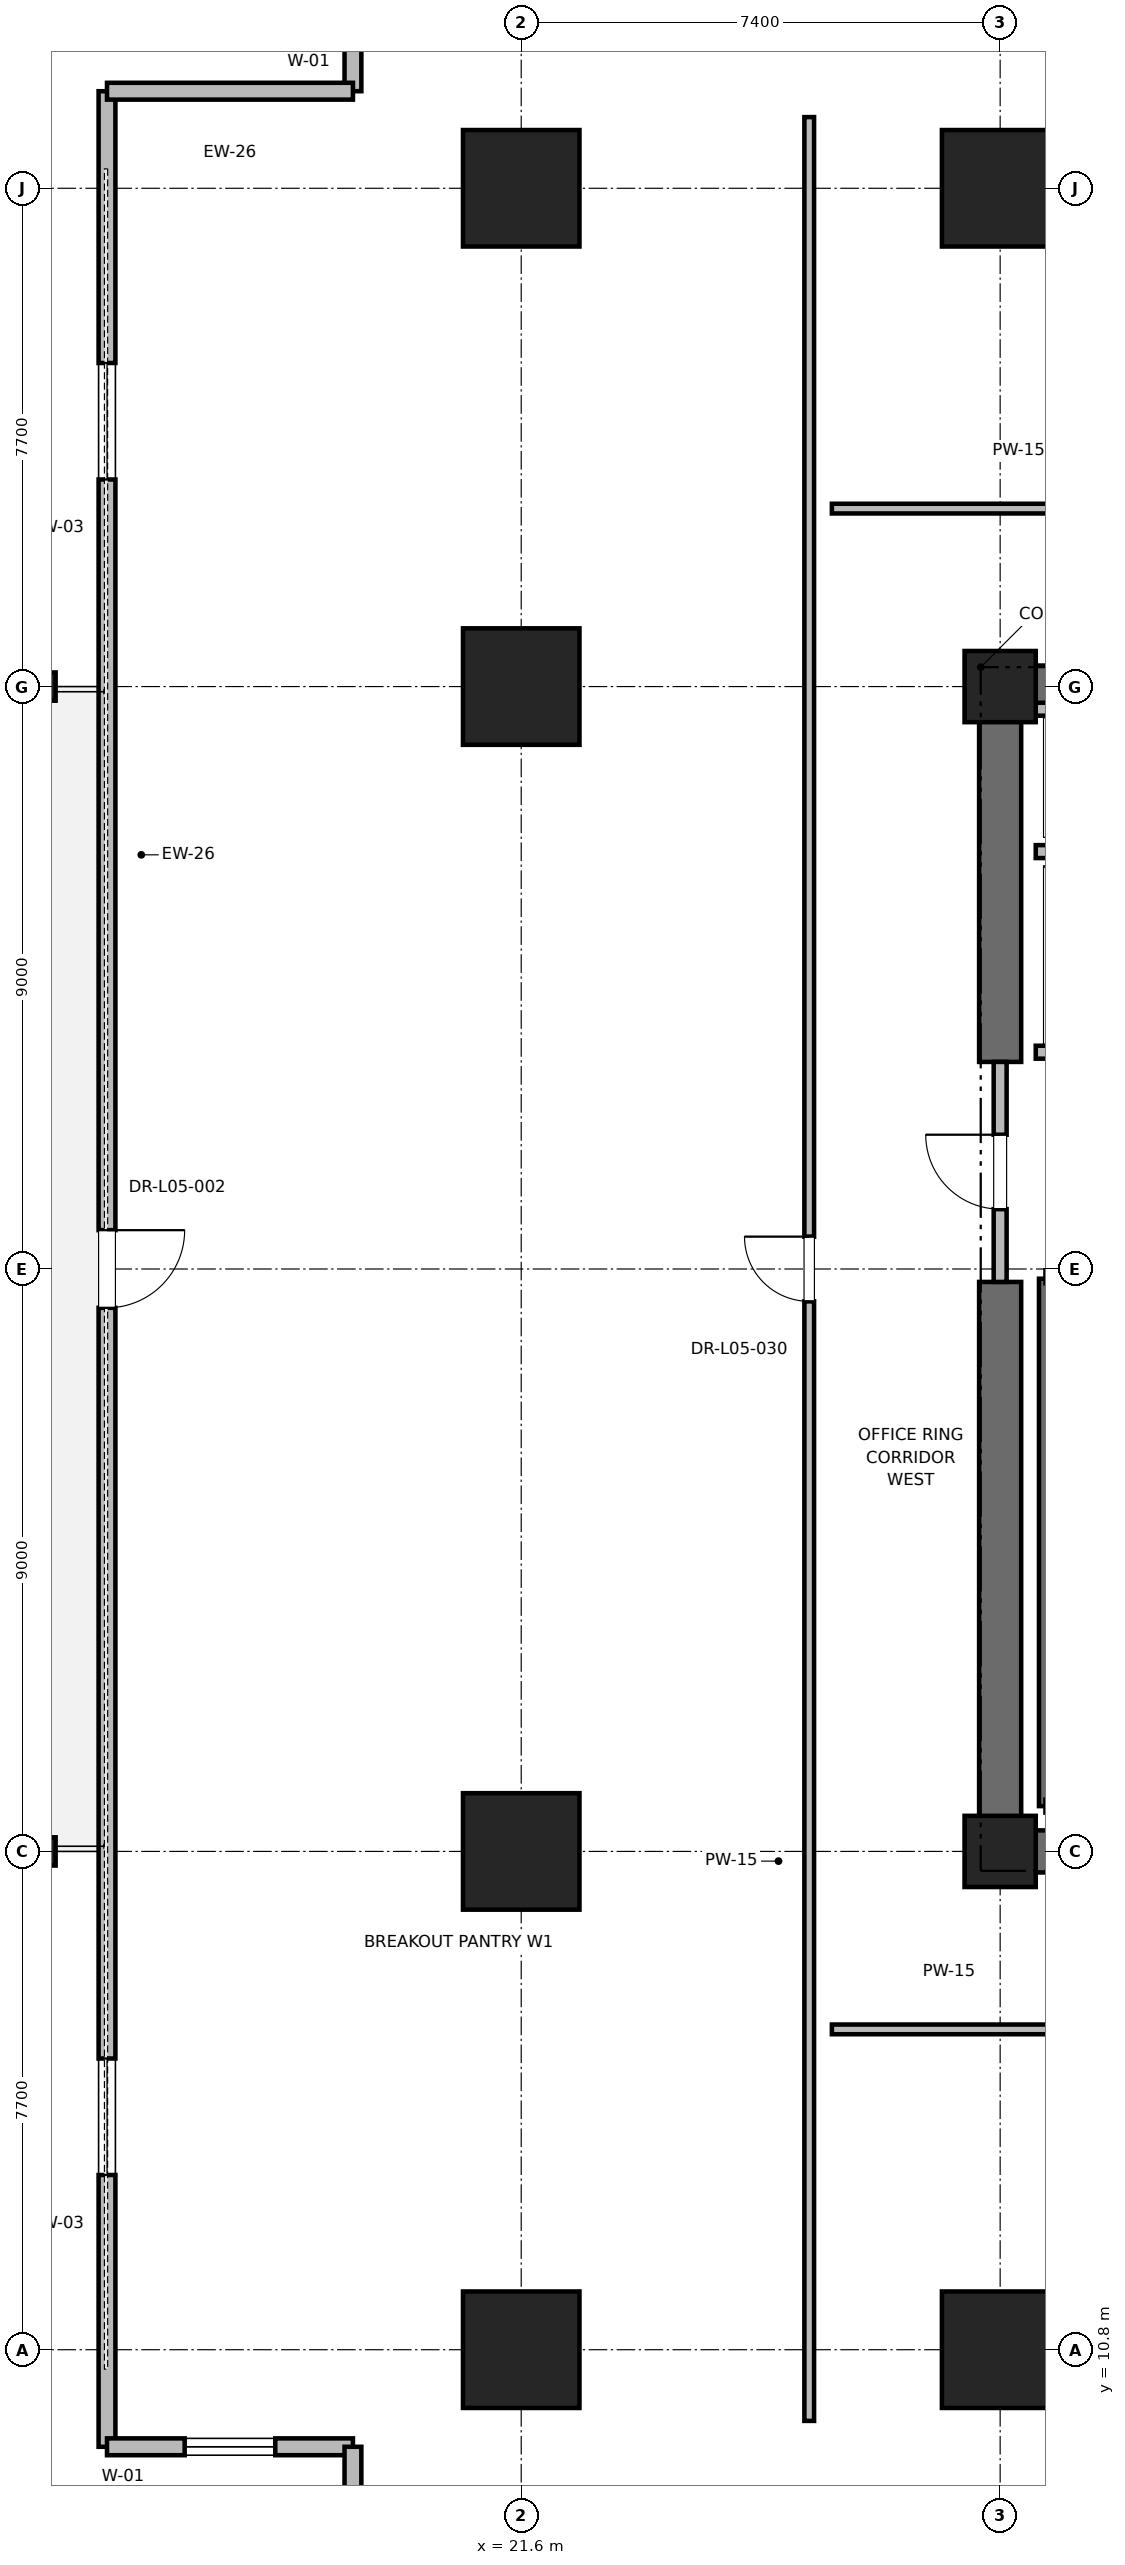
"""IFC4 building model, lengths in metres.
Left out: names, types, materials, properties, quantities, classifications, styles, units other than length and angle.
Written with IfcOpenShell. Run it as: python <this file> out.ifc"""

import sys

from ifc_helpers import new_model, si_unit, direction, frame, frame_2d, origin, origin_2d, place, context, subcontext, project, spatial, rectangle, i_section, extrude, element, fill, save


model = new_model("IFC4")
c1 = context("Model", 3, precision=1e-05, world=origin(), true_north=direction((0.0, 1.0)))
c2 = subcontext(c1, "Body", "Model", "MODEL_VIEW")
j1 = project(units=[si_unit("LENGTHUNIT", "METRE"), si_unit("PLANEANGLEUNIT", "RADIAN")], contexts=[c1])
p1 = place(None, origin())
s1 = spatial("IfcSite", under=j1, at=p1, CompositionType="ELEMENT")
p2 = place(p1, origin())
s2 = spatial("IfcBuilding", under=s1, at=p2, CompositionType="ELEMENT")
p3 = place(p2, frame((0.0, 0.0, 27.6)))
s3 = spatial("IfcBuildingStorey", under=s2, at=p3, CompositionType="ELEMENT", Elevation=27.6)
for number, where, z_axis, x_axis in (
    (1, (29.0, 10.8, 0.0), (0.0, 0.0, 1.0), (1.0, 0.0, 0.0)),
    (2, (29.0, 44.2, 0.0), (0.0, 0.0, 1.0), (1.0, 0.0, 0.0)),
    (3, (21.6, 18.5, 0.0), (0.0, 0.0, 1.0), (1.0, 0.0, 0.0)),
    (4, (21.6, 36.5, 0.0), (0.0, 0.0, 1.0), (1.0, 0.0, 0.0)),
    (5, (21.6, 10.8, 0.0), (0.0, 0.0, 1.0), (1.0, 0.0, 0.0)),
    (6, (21.6, 44.2, 0.0), (0.0, 0.0, 1.0), (1.0, 0.0, 0.0)),
):
    element("IfcColumn", number, at=place(p3, frame(where, z_axis=z_axis, x_axis=x_axis)), inside=s3, PredefinedType="COLUMN", context=c2, shape_type="SweptSolid", body=[
        extrude(rectangle(XDim=1.8, YDim=1.8, at=origin_2d()), origin(), (0.0, 0.0, 1.0), 4.0),
    ])
for number, where, z_axis, x_axis in (
    (7, (14.2, 18.5, 0.0), (0.0, 0.0, 1.0), (1.0, 0.0, 0.0)),
    (8, (14.2, 36.5, 0.0), (0.0, 0.0, 1.0), (1.0, 0.0, 0.0)),
):
    element("IfcColumn", number, at=place(p3, frame(where, z_axis=z_axis, x_axis=x_axis)), inside=s3, PredefinedType="COLUMN", context=c2, shape_type="SweptSolid", body=[
        extrude(i_section(OverallWidth=0.412, OverallDepth=0.437, WebThickness=0.036, FlangeThickness=0.058, FilletRadius=0.015, at=origin_2d()), origin(), (0.0, 0.0, 1.0), 4.0),
    ])
for number, where, z_axis, x_axis in (
    (9, (29.0, 18.5, 0.0), (0.0, 0.0, 1.0), (1.0, 0.0, 0.0)),
    (10, (29.0, 36.5, 0.0), (0.0, 0.0, 1.0), (1.0, 0.0, 0.0)),
):
    element("IfcColumn", number, at=place(p3, frame(where, z_axis=z_axis, x_axis=x_axis)), inside=s3, PredefinedType="PILASTER", context=c2, shape_type="SweptSolid", body=[
        extrude(rectangle(XDim=1.1, YDim=1.1, at=origin_2d()), origin(), (0.0, 0.0, 1.0), 4.0),
    ])
p4 = place(p3, frame((29.0, 18.5, 0.0), z_axis=(0.0, 0.0, 1.0), x_axis=(1.0, 0.0, 0.0)))
e11 = element("IfcWall", 11, at=p4, inside=s3, PredefinedType="SHEAR", context=c2, shape_type="SweptSolid", body=[
    extrude(rectangle(XDim=9.2, YDim=0.65, at=frame_2d((4.6, 0.0))), origin(), (0.0, 0.0, 1.0), 3.76),
])
p5 = place(p3, frame((29.0, 36.5, 0.0), z_axis=(0.0, 0.0, 1.0), x_axis=(1.0, 0.0, 0.0)))
e12 = element("IfcWall", 12, at=p5, inside=s3, PredefinedType="SHEAR", context=c2, shape_type="SweptSolid", body=[
    extrude(rectangle(XDim=5.8, YDim=0.65, at=frame_2d((2.9, 0.0))), origin(), (0.0, 0.0, 1.0), 3.76),
])
p6 = place(p3, frame((29.0, 18.5, 0.0), z_axis=(0.0, 0.0, 1.0), x_axis=(0.0, 1.0, 0.0)))
e13 = element("IfcWall", 13, at=p6, inside=s3, PredefinedType="SHEAR", context=c2, shape_type="SweptSolid", body=[
    extrude(rectangle(XDim=8.8, YDim=0.65, at=frame_2d((4.4, 0.0))), origin(), (0.0, 0.0, 1.0), 3.76),
])
p7 = place(p3, frame((29.0, 30.7, 0.0), z_axis=(0.0, 0.0, 1.0), x_axis=(0.0, 1.0, 0.0)))
e14 = element("IfcWall", 14, at=p7, inside=s3, PredefinedType="SHEAR", context=c2, shape_type="SweptSolid", body=[
    extrude(rectangle(XDim=5.8, YDim=0.65, at=frame_2d((2.9, 0.0))), origin(), (0.0, 0.0, 1.0), 3.76),
])
p8 = place(p3, frame((15.2, 45.7, 0.0), z_axis=(0.0, 0.0, 1.0), x_axis=(0.0, -1.0, 0.0)))
e15 = element("IfcWall", 15, at=p8, inside=s3, PredefinedType="PARAPET", context=c2, shape_type="SweptSolid", body=[
    extrude(rectangle(XDim=36.4, YDim=0.26, at=frame_2d((18.2, 0.0))), origin(), (0.0, 0.0, 1.0), 2.889),
])
p9 = place(p8, frame((4.2, 0.0, 0.85)))
e16 = element("IfcOpeningElement", 16, at=p9, cuts=e15, PredefinedType="OPENING", context=c2, shape_type="SweptSolid", body=[
    extrude(rectangle(XDim=1.8, YDim=2.2, at=frame_2d((0.9, 1.1))), frame((0.0, 0.13, 0.0), z_axis=(0.0, -1.0, 0.0), x_axis=(1.0, 0.0, 0.0)), (0.0, 0.0, 1.0), 0.26),
])
p10 = place(p8, frame((17.6, 0.0, 0.0)))
e17 = element("IfcOpeningElement", 17, at=p10, cuts=e15, PredefinedType="OPENING", context=c2, shape_type="SweptSolid", body=[
    extrude(rectangle(XDim=1.2, YDim=2.2, at=frame_2d((0.6, 1.1))), frame((0.0, 0.13, 0.0), z_axis=(0.0, -1.0, 0.0), x_axis=(1.0, 0.0, 0.0)), (0.0, 0.0, 1.0), 0.26),
])
p11 = place(p8, frame((30.4, 0.0, 0.85)))
e18 = element("IfcOpeningElement", 18, at=p11, cuts=e15, PredefinedType="OPENING", context=c2, shape_type="SweptSolid", body=[
    extrude(rectangle(XDim=1.8, YDim=2.2, at=frame_2d((0.9, 1.1))), frame((0.0, 0.13, 0.0), z_axis=(0.0, -1.0, 0.0), x_axis=(1.0, 0.0, 0.0)), (0.0, 0.0, 1.0), 0.26),
])
p12 = place(p3, frame((15.2, 9.3, 0.0), z_axis=(0.0, 0.0, 1.0), x_axis=(1.0, 0.0, 0.0)))
e19 = element("IfcWall", 19, at=p12, inside=s3, PredefinedType="PARAPET", context=c2, shape_type="SweptSolid", body=[
    extrude(rectangle(XDim=3.8, YDim=0.26, at=frame_2d((1.9, 0.0))), origin(), (0.0, 0.0, 1.0), 3.76),
])
p13 = place(p12, frame((1.2, 0.0, 0.85)))
e20 = element("IfcOpeningElement", 20, at=p13, cuts=e19, PredefinedType="OPENING", context=c2, shape_type="SweptSolid", body=[
    extrude(rectangle(XDim=1.4, YDim=2.0, at=frame_2d((0.7, 1.0))), frame((0.0, 0.13, 0.0), z_axis=(0.0, -1.0, 0.0), x_axis=(1.0, 0.0, 0.0)), (0.0, 0.0, 1.0), 0.26),
])
p14 = place(p3, frame((19.0, 9.3, 0.0), z_axis=(0.0, 0.0, 1.0), x_axis=(0.0, -1.0, 0.0)))
e21 = element("IfcWall", 21, at=p14, inside=s3, PredefinedType="PARAPET", context=c2, shape_type="SweptSolid", body=[
    extrude(rectangle(XDim=3.4, YDim=0.26, at=frame_2d((1.7, 0.0))), origin(), (0.0, 0.0, 1.0), 3.76),
])
p15 = place(p3, frame((19.0, 49.1, 0.0), z_axis=(0.0, 0.0, 1.0), x_axis=(0.0, -1.0, 0.0)))
e22 = element("IfcWall", 22, at=p15, inside=s3, PredefinedType="PARAPET", context=c2, shape_type="SweptSolid", body=[
    extrude(rectangle(XDim=3.4, YDim=0.26, at=frame_2d((1.7, 0.0))), origin(), (0.0, 0.0, 1.0), 3.76),
])
p16 = place(p15, frame((1.0, 0.0, 0.85)))
e23 = element("IfcOpeningElement", 23, at=p16, cuts=e22, PredefinedType="OPENING", context=c2, shape_type="SweptSolid", body=[
    extrude(rectangle(XDim=1.4, YDim=2.0, at=frame_2d((0.7, 1.0))), frame((0.0, 0.13, 0.0), z_axis=(0.0, -1.0, 0.0), x_axis=(1.0, 0.0, 0.0)), (0.0, 0.0, 1.0), 0.26),
])
p17 = place(p3, frame((19.0, 45.7, 0.0), z_axis=(0.0, 0.0, 1.0), x_axis=(-1.0, 0.0, 0.0)))
e24 = element("IfcWall", 24, at=p17, inside=s3, PredefinedType="PARAPET", context=c2, shape_type="SweptSolid", body=[
    extrude(rectangle(XDim=3.8, YDim=0.26, at=frame_2d((1.9, 0.0))), origin(), (0.0, 0.0, 1.0), 3.76),
])
p18 = place(p3, frame((29.7, 19.2, 0.0), z_axis=(0.0, 0.0, 1.0), x_axis=(0.0, 1.0, 0.0)))
e25 = element("IfcWall", 25, at=p18, inside=s3, PredefinedType="SOLIDWALL", context=c2, shape_type="SweptSolid", body=[
    extrude(rectangle(XDim=8.15, YDim=0.2, at=frame_2d((4.075, 0.0))), origin(), (0.0, 0.0, 1.0), 3.76),
])
p19 = place(p3, frame((29.0, 27.3, 0.0), z_axis=(0.0, 0.0, 1.0), x_axis=(0.0, 1.0, 0.0)))
e26 = element("IfcWall", 26, at=p19, inside=s3, PredefinedType="PARTITIONING", context=c2, shape_type="SweptSolid", body=[
    extrude(rectangle(XDim=3.4, YDim=0.2, at=frame_2d((1.7, 0.0))), origin(), (0.0, 0.0, 1.0), 2.54),
])
p20 = place(p19, frame((1.125, 0.0, 0.0)))
e27 = element("IfcOpeningElement", 27, at=p20, cuts=e26, PredefinedType="OPENING", context=c2, shape_type="SweptSolid", body=[
    extrude(rectangle(XDim=1.15, YDim=2.2, at=frame_2d((0.575, 1.1))), frame((0.0, 0.1, 0.0), z_axis=(0.0, -1.0, 0.0), x_axis=(1.0, 0.0, 0.0)), (0.0, 0.0, 1.0), 0.2),
])
p21 = place(p3, frame((29.55, 30.85, 0.0), z_axis=(0.0, 0.0, 1.0), x_axis=(1.0, 0.0, 0.0)))
e28 = element("IfcWall", 28, at=p21, inside=s3, PredefinedType="SOLIDWALL", context=c2, shape_type="SweptSolid", body=[
    extrude(rectangle(XDim=2.6, YDim=0.2, at=frame_2d((1.3, 0.0))), origin(), (0.0, 0.0, 1.0), 2.54),
])
p22 = place(p21, frame((0.75, 0.0, 0.0)))
e29 = element("IfcOpeningElement", 29, at=p22, cuts=e28, PredefinedType="OPENING", context=c2, shape_type="SweptSolid", body=[
    extrude(rectangle(XDim=1.1, YDim=2.2, at=frame_2d((0.55, 1.1))), frame((0.0, 0.1, 0.0), z_axis=(0.0, -1.0, 0.0), x_axis=(1.0, 0.0, 0.0)), (0.0, 0.0, 1.0), 0.2),
])
p23 = place(p3, frame((29.55, 33.95, 0.0), z_axis=(0.0, 0.0, 1.0), x_axis=(1.0, 0.0, 0.0)))
e30 = element("IfcWall", 30, at=p23, inside=s3, PredefinedType="SOLIDWALL", context=c2, shape_type="SweptSolid", body=[
    extrude(rectangle(XDim=2.8, YDim=0.2, at=frame_2d((1.4, 0.0))), origin(), (0.0, 0.0, 1.0), 3.76),
])
p24 = place(p3, frame((32.35, 36.15, 0.0), z_axis=(0.0, 0.0, 1.0), x_axis=(-1.0, 0.0, 0.0)))
e31 = element("IfcWall", 31, at=p24, inside=s3, PredefinedType="SOLIDWALL", context=c2, shape_type="SweptSolid", body=[
    extrude(rectangle(XDim=2.8, YDim=0.2, at=frame_2d((1.4, 0.0))), origin(), (0.0, 0.0, 1.0), 2.889),
])
p25 = place(p3, frame((26.4, 39.25, 0.0), z_axis=(0.0, 0.0, 1.0), x_axis=(1.0, 0.0, 0.0)))
e32 = element("IfcWall", 32, at=p25, inside=s3, PredefinedType="PARTITIONING", context=c2, shape_type="SweptSolid", body=[
    extrude(rectangle(XDim=12.512, YDim=0.15, at=frame_2d((6.256, 0.0))), origin(), (0.0, 0.0, 1.0), 2.85),
])
p26 = place(p25, frame((5.771, 0.0, 0.0)))
e33 = element("IfcOpeningElement", 33, at=p26, cuts=e32, PredefinedType="OPENING", context=c2, shape_type="SweptSolid", body=[
    extrude(rectangle(XDim=1.0, YDim=2.15, at=frame_2d((0.5, 1.075))), frame((0.0, 0.075, 0.0), z_axis=(0.0, -1.0, 0.0), x_axis=(1.0, 0.0, 0.0)), (0.0, 0.0, 1.0), 0.15),
])
p27 = place(p3, frame((26.4, 15.75, 0.0), z_axis=(0.0, 0.0, 1.0), x_axis=(1.0, 0.0, 0.0)))
e34 = element("IfcWall", 34, at=p27, inside=s3, PredefinedType="PARTITIONING", context=c2, shape_type="SweptSolid", body=[
    extrude(rectangle(XDim=8.704, YDim=0.15, at=frame_2d((4.352, 0.0))), origin(), (0.0, 0.0, 1.0), 2.85),
])
p28 = place(p27, frame((3.617, 0.0, 0.0)))
e35 = element("IfcOpeningElement", 35, at=p28, cuts=e34, PredefinedType="OPENING", context=c2, shape_type="SweptSolid", body=[
    extrude(rectangle(XDim=1.5, YDim=2.25, at=frame_2d((0.75, 1.125))), frame((0.0, 0.075, 0.0), z_axis=(0.0, -1.0, 0.0), x_axis=(1.0, 0.0, 0.0)), (0.0, 0.0, 1.0), 0.15),
])
p29 = place(p3, frame((26.05, 9.7, 0.0), z_axis=(0.0, 0.0, 1.0), x_axis=(0.0, 1.0, 0.0)))
e36 = element("IfcWall", 36, at=p29, inside=s3, PredefinedType="PARTITIONING", context=c2, shape_type="SweptSolid", body=[
    extrude(rectangle(XDim=35.6, YDim=0.15, at=frame_2d((17.8, 0.0))), origin(), (0.0, 0.0, 1.0), 2.85),
])
p30 = place(p29, frame((17.3, 0.0, 0.0)))
e37 = element("IfcOpeningElement", 37, at=p30, cuts=e36, PredefinedType="OPENING", context=c2, shape_type="SweptSolid", body=[
    extrude(rectangle(XDim=1.0, YDim=2.15, at=frame_2d((0.5, 1.075))), frame((0.0, 0.075, 0.0), z_axis=(0.0, -1.0, 0.0), x_axis=(1.0, 0.0, 0.0)), (0.0, 0.0, 1.0), 0.15),
])
p31 = place(p9, origin())
e38 = element("IfcWindow", 38, at=p31, inside=s3, PartitioningType="SINGLE_PANEL", PredefinedType="WINDOW", context=c2, shape_type="SweptSolid", body=[
    extrude(rectangle(XDim=1.8, YDim=2.2, at=frame_2d((0.9, 1.1))), frame((0.0, 0.03, 0.0), z_axis=(0.0, -1.0, 0.0), x_axis=(1.0, 0.0, 0.0)), (0.0, 0.0, 1.0), 0.06),
])
fill(e16, e38)
p32 = place(p10, origin())
e39 = element("IfcDoor", 39, at=p32, inside=s3, OperationType="SINGLE_SWING_LEFT", PredefinedType="DOOR", context=c2, shape_type="SweptSolid", body=[
    extrude(rectangle(XDim=1.2, YDim=2.2, at=frame_2d((0.6, 1.1))), frame((0.0, 0.025, 0.0), z_axis=(0.0, -1.0, 0.0), x_axis=(1.0, 0.0, 0.0)), (0.0, 0.0, 1.0), 0.05),
])
fill(e17, e39)
p33 = place(p11, origin())
e40 = element("IfcWindow", 40, at=p33, inside=s3, PartitioningType="SINGLE_PANEL", PredefinedType="WINDOW", context=c2, shape_type="SweptSolid", body=[
    extrude(rectangle(XDim=1.8, YDim=2.2, at=frame_2d((0.9, 1.1))), frame((0.0, 0.03, 0.0), z_axis=(0.0, -1.0, 0.0), x_axis=(1.0, 0.0, 0.0)), (0.0, 0.0, 1.0), 0.06),
])
fill(e18, e40)
p34 = place(p13, origin())
e41 = element("IfcWindow", 41, at=p34, inside=s3, PartitioningType="SINGLE_PANEL", PredefinedType="WINDOW", context=c2, shape_type="SweptSolid", body=[
    extrude(rectangle(XDim=1.4, YDim=2.0, at=frame_2d((0.7, 1.0))), frame((0.0, 0.03, 0.0), z_axis=(0.0, -1.0, 0.0), x_axis=(1.0, 0.0, 0.0)), (0.0, 0.0, 1.0), 0.06),
])
fill(e20, e41)
p35 = place(p20, origin())
e42 = element("IfcDoor", 42, at=p35, inside=s3, OperationType="SINGLE_SWING_RIGHT", PredefinedType="DOOR", context=c2, shape_type="SweptSolid", body=[
    extrude(rectangle(XDim=1.15, YDim=2.2, at=frame_2d((0.575, 1.1))), frame((0.0, 0.025, 0.0), z_axis=(0.0, -1.0, 0.0), x_axis=(1.0, 0.0, 0.0)), (0.0, 0.0, 1.0), 0.05),
])
fill(e27, e42)
p36 = place(p30, origin())
e43 = element("IfcDoor", 43, at=p36, inside=s3, OperationType="SINGLE_SWING_RIGHT", PredefinedType="DOOR", context=c2, shape_type="SweptSolid", body=[
    extrude(rectangle(XDim=1.0, YDim=2.15, at=frame_2d((0.5, 1.075))), frame((0.0, 0.025, 0.0), z_axis=(0.0, -1.0, 0.0), x_axis=(1.0, 0.0, 0.0)), (0.0, 0.0, 1.0), 0.05),
])
fill(e37, e43)
save(model, sys.argv[1])
